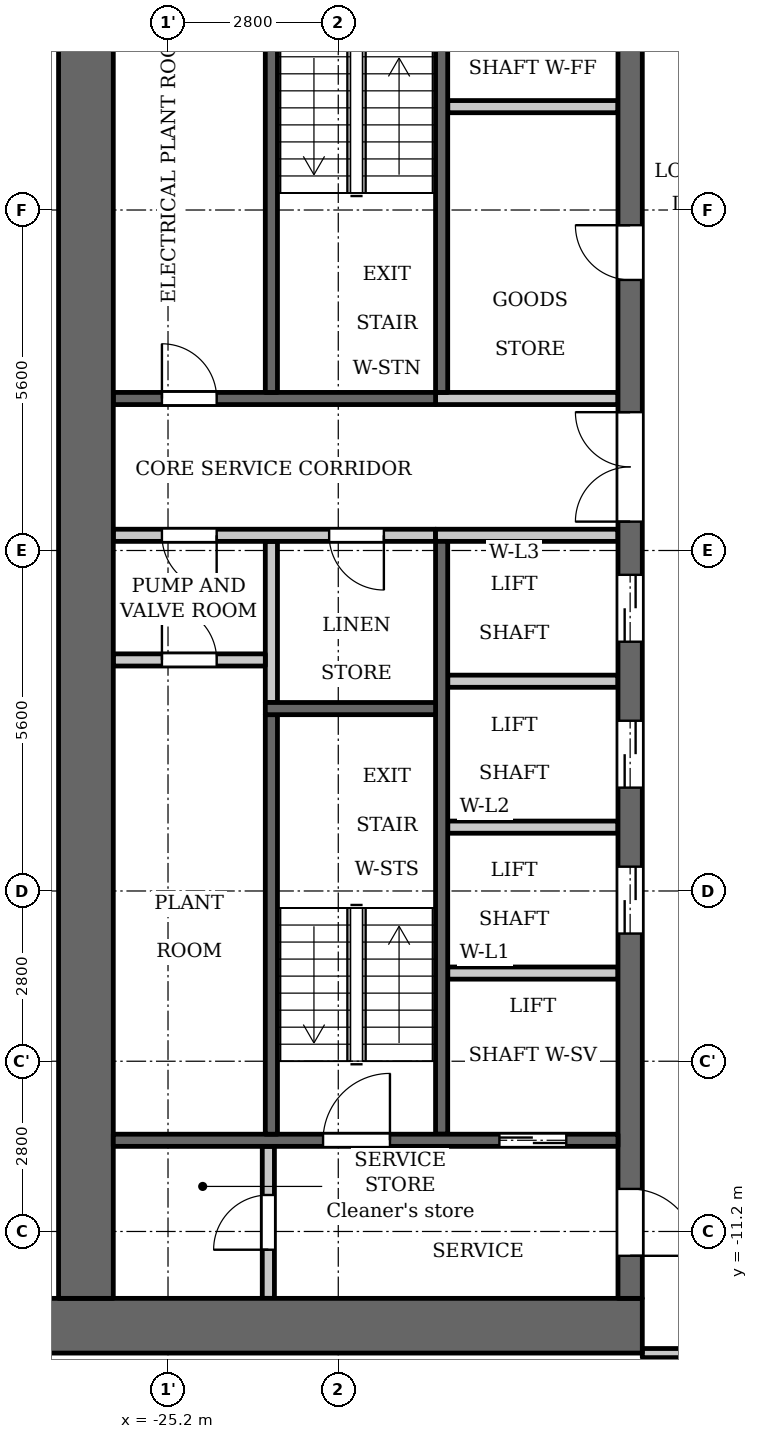
"""IFC4 building model, lengths in metres.
Left out: names, types, materials, properties, quantities, classifications, styles, units other than length and angle.
Written with IfcOpenShell. Run it as: python <this file> out.ifc"""

import sys

from ifc_helpers import new_model, si_unit, direction, frame, frame_2d, origin, place, context, subcontext, project, spatial, rectangle, extrude, element, fill, save


model = new_model("IFC4")
c1 = context("Model", 3, precision=1e-05, world=origin(), true_north=direction((0.0, 1.0)))
c2 = subcontext(c1, "Body", "Model", "MODEL_VIEW")
j1 = project(units=[si_unit("LENGTHUNIT", "METRE"), si_unit("PLANEANGLEUNIT", "RADIAN")], contexts=[c1])
p1 = place(None, origin())
s1 = spatial("IfcSite", under=j1, at=p1, CompositionType="ELEMENT")
p2 = place(p1, origin())
s2 = spatial("IfcBuilding", under=s1, at=p2, CompositionType="ELEMENT")
p3 = place(p2, frame((0.0, 0.0, 30.5)))
s3 = spatial("IfcBuildingStorey", under=s2, at=p3, CompositionType="ELEMENT", Elevation=30.5)
p4 = place(p3, frame((-23.5, -2.5, 0.0), z_axis=(0.0, 0.0, 1.0), x_axis=(0.0, 1.0, 0.0)))
e1 = element("IfcWall", 1, at=p4, inside=s3, PredefinedType="PARTITIONING", context=c2, shape_type="SweptSolid", body=[
    extrude(rectangle(XDim=2.65, YDim=0.2, at=frame_2d((1.325, 0.0))), origin(), (0.0, 0.0, 1.0), 3.2),
])
p5 = place(p3, frame((-20.7, 2.6, 0.0), z_axis=(0.0, 0.0, 1.0), x_axis=(0.0, 1.0, 0.0)))
e2 = element("IfcWall", 2, at=p5, inside=s3, PredefinedType="SHEAR", context=c2, shape_type="SweptSolid", body=[
    extrude(rectangle(XDim=7.0, YDim=0.2, at=frame_2d((3.5, 0.0))), origin(), (0.0, 0.0, 1.0), 3.2),
])
p6 = place(p3, frame((-20.7, -9.6, 0.0), z_axis=(0.0, 0.0, 1.0), x_axis=(0.0, 1.0, 0.0)))
e3 = element("IfcWall", 3, at=p6, inside=s3, PredefinedType="SHEAR", context=c2, shape_type="SweptSolid", body=[
    extrude(rectangle(XDim=9.75, YDim=0.2, at=frame_2d((4.875, 0.0))), origin(), (0.0, 0.0, 1.0), 3.2),
])
p7 = place(p3, frame((-20.8, 2.5, 0.0), z_axis=(0.0, 0.0, 1.0), x_axis=(-1.0, 0.0, 0.0)))
e4 = element("IfcWall", 4, at=p7, inside=s3, PredefinedType="SHEAR", context=c2, shape_type="SweptSolid", body=[
    extrude(rectangle(XDim=5.3, YDim=0.2, at=frame_2d((2.65, 0.0))), origin(), (0.0, 0.0, 1.0), 3.2),
])
p8 = place(p7, frame((3.6, 0.0, 0.0)))
e5 = element("IfcOpeningElement", 5, at=p8, cuts=e4, PredefinedType="OPENING", context=c2, shape_type="SweptSolid", body=[
    extrude(rectangle(XDim=0.9, YDim=2.1, at=frame_2d((0.45, 1.05))), frame((0.0, 0.11, 0.0), z_axis=(0.0, -1.0, 0.0), x_axis=(1.0, 0.0, 0.0)), (0.0, 0.0, 1.0), 0.22),
])
p9 = place(p3, frame((-20.8, 0.25, 0.0), z_axis=(0.0, 0.0, 1.0), x_axis=(-1.0, 0.0, 0.0)))
e6 = element("IfcWall", 6, at=p9, inside=s3, PredefinedType="PARTITIONING", context=c2, shape_type="SweptSolid", body=[
    extrude(rectangle(XDim=5.3, YDim=0.2, at=frame_2d((2.65, 0.0))), origin(), (0.0, 0.0, 1.0), 3.2),
])
p10 = place(p9, frame((0.85, 0.0, 0.0)))
e7 = element("IfcOpeningElement", 7, at=p10, cuts=e6, PredefinedType="OPENING", context=c2, shape_type="SweptSolid", body=[
    extrude(rectangle(XDim=0.9, YDim=2.1, at=frame_2d((0.45, 1.05))), frame((0.0, 0.11, 0.0), z_axis=(0.0, -1.0, 0.0), x_axis=(1.0, 0.0, 0.0)), (0.0, 0.0, 1.0), 0.22),
])
p11 = place(p9, frame((3.6, 0.0, 0.0)))
e8 = element("IfcOpeningElement", 8, at=p11, cuts=e6, PredefinedType="OPENING", context=c2, shape_type="SweptSolid", body=[
    extrude(rectangle(XDim=0.9, YDim=2.1, at=frame_2d((0.45, 1.05))), frame((0.0, 0.11, 0.0), z_axis=(0.0, -1.0, 0.0), x_axis=(1.0, 0.0, 0.0)), (0.0, 0.0, 1.0), 0.22),
])
p12 = place(p3, frame((-17.4, -12.75, 0.0), z_axis=(0.0, 0.0, 1.0), x_axis=(-1.0, 0.0, 0.0)))
e9 = element("IfcWall", 9, at=p12, inside=s3, PredefinedType="SHEAR", context=c2, shape_type="SweptSolid", body=[
    extrude(rectangle(XDim=10.4, YDim=0.9, at=frame_2d((5.2, 0.0))), origin(), (0.0, 0.0, 1.0), 3.2),
])
p13 = place(p3, frame((-17.6, -12.3, 0.0), z_axis=(0.0, 0.0, 1.0), x_axis=(0.0, 1.0, 0.0)))
e10 = element("IfcWall", 10, at=p13, inside=s3, PredefinedType="SHEAR", context=c2, shape_type="SweptSolid", body=[
    extrude(rectangle(XDim=24.6, YDim=0.4, at=frame_2d((12.3, 0.0))), origin(), (0.0, 0.0, 1.0), 3.2),
])
p14 = place(p13, frame((6.0, 0.0, 0.0)))
e11 = element("IfcOpeningElement", 11, at=p14, cuts=e10, PredefinedType="OPENING", context=c2, shape_type="SweptSolid", body=[
    extrude(rectangle(XDim=1.1, YDim=2.1, at=frame_2d((0.55, 1.05))), frame((0.0, 0.21, 0.0), z_axis=(0.0, -1.0, 0.0), x_axis=(1.0, 0.0, 0.0)), (0.0, 0.0, 1.0), 0.42),
])
p15 = place(p13, frame((8.4, 0.0, 0.0)))
e12 = element("IfcOpeningElement", 12, at=p15, cuts=e10, PredefinedType="OPENING", context=c2, shape_type="SweptSolid", body=[
    extrude(rectangle(XDim=1.1, YDim=2.1, at=frame_2d((0.55, 1.05))), frame((0.0, 0.21, 0.0), z_axis=(0.0, -1.0, 0.0), x_axis=(1.0, 0.0, 0.0)), (0.0, 0.0, 1.0), 0.42),
])
p16 = place(p13, frame((10.8, 0.0, 0.0)))
e13 = element("IfcOpeningElement", 13, at=p16, cuts=e10, PredefinedType="OPENING", context=c2, shape_type="SweptSolid", body=[
    extrude(rectangle(XDim=1.1, YDim=2.1, at=frame_2d((0.55, 1.05))), frame((0.0, 0.21, 0.0), z_axis=(0.0, -1.0, 0.0), x_axis=(1.0, 0.0, 0.0)), (0.0, 0.0, 1.0), 0.42),
])
p17 = place(p13, frame((16.75, 0.0, 0.0)))
e14 = element("IfcOpeningElement", 14, at=p17, cuts=e10, PredefinedType="OPENING", context=c2, shape_type="SweptSolid", body=[
    extrude(rectangle(XDim=0.9, YDim=2.1, at=frame_2d((0.45, 1.05))), frame((0.0, 0.21, 0.0), z_axis=(0.0, -1.0, 0.0), x_axis=(1.0, 0.0, 0.0)), (0.0, 0.0, 1.0), 0.42),
])
p18 = place(p13, frame((22.8, 0.0, 0.0)))
e15 = element("IfcOpeningElement", 15, at=p18, cuts=e10, PredefinedType="OPENING", context=c2, shape_type="SweptSolid", body=[
    extrude(rectangle(XDim=1.1, YDim=2.1, at=frame_2d((0.55, 1.05))), frame((0.0, 0.21, 0.0), z_axis=(0.0, -1.0, 0.0), x_axis=(1.0, 0.0, 0.0)), (0.0, 0.0, 1.0), 0.42),
])
p19 = place(p13, frame((0.7, 0.0, 0.0)))
e16 = element("IfcOpeningElement", 16, at=p19, cuts=e10, PredefinedType="OPENING", context=c2, shape_type="SweptSolid", body=[
    extrude(rectangle(XDim=1.1, YDim=2.1, at=frame_2d((0.55, 1.05))), frame((0.0, 0.21, 0.0), z_axis=(0.0, -1.0, 0.0), x_axis=(1.0, 0.0, 0.0)), (0.0, 0.0, 1.0), 0.42),
])
p20 = place(p13, frame((12.775, 0.0, 0.0)))
e17 = element("IfcOpeningElement", 17, at=p20, cuts=e10, PredefinedType="OPENING", context=c2, shape_type="SweptSolid", body=[
    extrude(rectangle(XDim=1.8, YDim=2.1, at=frame_2d((0.9, 1.05))), frame((0.0, 0.21, 0.0), z_axis=(0.0, -1.0, 0.0), x_axis=(1.0, 0.0, 0.0)), (0.0, 0.0, 1.0), 0.42),
])
p21 = place(p3, frame((-26.55, -12.3, 0.0), z_axis=(0.0, 0.0, 1.0), x_axis=(0.0, 1.0, 0.0)))
e18 = element("IfcWall", 18, at=p21, inside=s3, PredefinedType="SHEAR", context=c2, shape_type="SweptSolid", body=[
    extrude(rectangle(XDim=24.6, YDim=0.9, at=frame_2d((12.3, 0.0))), origin(), (0.0, 0.0, 1.0), 3.2),
])
p22 = place(p3, frame((-23.55, -12.3, 0.0), z_axis=(0.0, 0.0, 1.0), x_axis=(0.0, 1.0, 0.0)))
e19 = element("IfcWall", 19, at=p22, inside=s3, PredefinedType="PARTITIONING", context=c2, shape_type="SweptSolid", body=[
    extrude(rectangle(XDim=2.5, YDim=0.2, at=frame_2d((1.25, 0.0))), origin(), (0.0, 0.0, 1.0), 3.2),
])
p23 = place(p22, frame((0.8, 0.0, 0.0)))
e20 = element("IfcOpeningElement", 20, at=p23, cuts=e19, PredefinedType="OPENING", context=c2, shape_type="SweptSolid", body=[
    extrude(rectangle(XDim=0.9, YDim=2.1, at=frame_2d((0.45, 1.05))), frame((0.0, 0.11, 0.0), z_axis=(0.0, -1.0, 0.0), x_axis=(1.0, 0.0, 0.0)), (0.0, 0.0, 1.0), 0.22),
])
p24 = place(p3, frame((-23.6, -1.8, 0.0), z_axis=(0.0, 0.0, 1.0), x_axis=(-1.0, 0.0, 0.0)))
e21 = element("IfcWall", 21, at=p24, inside=s3, PredefinedType="PARTITIONING", context=c2, shape_type="SweptSolid", body=[
    extrude(rectangle(XDim=2.5, YDim=0.2, at=frame_2d((1.25, 0.0))), origin(), (0.0, 0.0, 1.0), 3.2),
])
p25 = place(p24, frame((0.8, 0.0, 0.0)))
e22 = element("IfcOpeningElement", 22, at=p25, cuts=e21, PredefinedType="OPENING", context=c2, shape_type="SweptSolid", body=[
    extrude(rectangle(XDim=0.9, YDim=2.1, at=frame_2d((0.45, 1.05))), frame((0.0, 0.11, 0.0), z_axis=(0.0, -1.0, 0.0), x_axis=(1.0, 0.0, 0.0)), (0.0, 0.0, 1.0), 0.22),
])
p26 = place(p3, frame((-17.8, -9.7, 0.0), z_axis=(0.0, 0.0, 1.0), x_axis=(-1.0, 0.0, 0.0)))
e23 = element("IfcWall", 23, at=p26, inside=s3, PredefinedType="SHEAR", context=c2, shape_type="SweptSolid", body=[
    extrude(rectangle(XDim=8.3, YDim=0.2, at=frame_2d((4.15, 0.0))), origin(), (0.0, 0.0, 1.0), 3.2),
])
p27 = place(p26, frame((0.85, 0.0, 0.0)))
e24 = element("IfcOpeningElement", 24, at=p27, cuts=e23, PredefinedType="OPENING", context=c2, shape_type="SweptSolid", body=[
    extrude(rectangle(XDim=1.1, YDim=2.1, at=frame_2d((0.55, 1.05))), frame((0.0, 0.11, 0.0), z_axis=(0.0, -1.0, 0.0), x_axis=(1.0, 0.0, 0.0)), (0.0, 0.0, 1.0), 0.22),
])
p28 = place(p26, frame((3.75, 0.0, 0.0)))
e25 = element("IfcOpeningElement", 25, at=p28, cuts=e23, PredefinedType="OPENING", context=c2, shape_type="SweptSolid", body=[
    extrude(rectangle(XDim=1.1, YDim=2.1, at=frame_2d((0.55, 1.05))), frame((0.0, 0.11, 0.0), z_axis=(0.0, -1.0, 0.0), x_axis=(1.0, 0.0, 0.0)), (0.0, 0.0, 1.0), 0.22),
])
for number, where, z_axis, x_axis in (
    (26, (-17.8, -6.95, 0.0), (0.0, 0.0, 1.0), (-1.0, 0.0, 0.0)),
    (27, (-17.8, -4.55, 0.0), (0.0, 0.0, 1.0), (-1.0, 0.0, 0.0)),
    (28, (-17.8, -2.15, 0.0), (0.0, 0.0, 1.0), (-1.0, 0.0, 0.0)),
):
    element("IfcWall", number, at=place(p3, frame(where, z_axis=z_axis, x_axis=x_axis)), inside=s3, PredefinedType="PARTITIONING", context=c2, shape_type="SweptSolid", body=[
        extrude(rectangle(XDim=2.8, YDim=0.2, at=frame_2d((1.4, 0.0))), origin(), (0.0, 0.0, 1.0), 3.2),
    ])
for number, where, z_axis, x_axis in (
    (29, (-17.8, 0.25, 0.0), (0.0, 0.0, 1.0), (-1.0, 0.0, 0.0)),
    (30, (-17.8, 2.5, 0.0), (0.0, 0.0, 1.0), (-1.0, 0.0, 0.0)),
):
    element("IfcWall", number, at=place(p3, frame(where, z_axis=z_axis, x_axis=x_axis)), inside=s3, PredefinedType="PARTITIONING", context=c2, shape_type="SweptSolid", body=[
        extrude(rectangle(XDim=3.0, YDim=0.2, at=frame_2d((1.5, 0.0))), origin(), (0.0, 0.0, 1.0), 3.2),
    ])
p29 = place(p3, frame((-17.8, 7.3, 0.0), z_axis=(0.0, 0.0, 1.0), x_axis=(-1.0, 0.0, 0.0)))
e31 = element("IfcWall", 31, at=p29, inside=s3, PredefinedType="PARTITIONING", context=c2, shape_type="SweptSolid", body=[
    extrude(rectangle(XDim=2.8, YDim=0.2, at=frame_2d((1.4, 0.0))), origin(), (0.0, 0.0, 1.0), 3.2),
])
p30 = place(p3, frame((-23.5, 2.6, 0.0), z_axis=(0.0, 0.0, 1.0), x_axis=(0.0, 1.0, 0.0)))
e32 = element("IfcWall", 32, at=p30, inside=s3, PredefinedType="SHEAR", context=c2, shape_type="SweptSolid", body=[
    extrude(rectangle(XDim=7.0, YDim=0.2, at=frame_2d((3.5, 0.0))), origin(), (0.0, 0.0, 1.0), 3.2),
])
p31 = place(p3, frame((-23.5, -9.6, 0.0), z_axis=(0.0, 0.0, 1.0), x_axis=(0.0, 1.0, 0.0)))
e33 = element("IfcWall", 33, at=p31, inside=s3, PredefinedType="SHEAR", context=c2, shape_type="SweptSolid", body=[
    extrude(rectangle(XDim=6.9, YDim=0.2, at=frame_2d((3.45, 0.0))), origin(), (0.0, 0.0, 1.0), 3.2),
])
p32 = place(p3, frame((-20.8, -2.6, 0.0), z_axis=(0.0, 0.0, 1.0), x_axis=(-1.0, 0.0, 0.0)))
e34 = element("IfcWall", 34, at=p32, inside=s3, PredefinedType="SHEAR", context=c2, shape_type="SweptSolid", body=[
    extrude(rectangle(XDim=2.8, YDim=0.2, at=frame_2d((1.4, 0.0))), origin(), (0.0, 0.0, 1.0), 3.2),
])
p33 = place(p3, frame((-17.4, -13.2, 0.0), z_axis=(0.0, 0.0, 1.0), x_axis=(1.0, 0.0, 0.0)))
e35 = element("IfcWall", 35, at=p33, inside=s3, PredefinedType="PARTITIONING", context=c2, shape_type="SweptSolid", body=[
    extrude(rectangle(XDim=34.8, YDim=0.15, at=frame_2d((17.4, 0.0))), origin(), (0.0, 0.0, 1.0), 3.2),
])
p34 = place(p33, frame((0.65, 0.0, 0.0)))
e36 = element("IfcOpeningElement", 36, at=p34, cuts=e35, PredefinedType="OPENING", context=c2, shape_type="SweptSolid", body=[
    extrude(rectangle(XDim=1.0, YDim=2.1, at=frame_2d((0.5, 1.05))), frame((0.0, 0.085, 0.0), z_axis=(0.0, -1.0, 0.0), x_axis=(1.0, 0.0, 0.0)), (0.0, 0.0, 1.0), 0.17),
])
p35 = place(p33, frame((33.05, 0.0, 0.0)))
e37 = element("IfcOpeningElement", 37, at=p35, cuts=e35, PredefinedType="OPENING", context=c2, shape_type="SweptSolid", body=[
    extrude(rectangle(XDim=1.0, YDim=2.1, at=frame_2d((0.5, 1.05))), frame((0.0, 0.085, 0.0), z_axis=(0.0, -1.0, 0.0), x_axis=(1.0, 0.0, 0.0)), (0.0, 0.0, 1.0), 0.17),
])
p36 = place(p33, frame((4.55, 0.0, 0.0)))
e38 = element("IfcOpeningElement", 38, at=p36, cuts=e35, PredefinedType="OPENING", context=c2, shape_type="SweptSolid", body=[
    extrude(rectangle(XDim=1.0, YDim=2.1, at=frame_2d((0.5, 1.05))), frame((0.0, 0.085, 0.0), z_axis=(0.0, -1.0, 0.0), x_axis=(1.0, 0.0, 0.0)), (0.0, 0.0, 1.0), 0.17),
])
p37 = place(p33, frame((6.9, 0.0, 0.0)))
e39 = element("IfcOpeningElement", 39, at=p37, cuts=e35, PredefinedType="OPENING", context=c2, shape_type="SweptSolid", body=[
    extrude(rectangle(XDim=1.0, YDim=2.1, at=frame_2d((0.5, 1.05))), frame((0.0, 0.085, 0.0), z_axis=(0.0, -1.0, 0.0), x_axis=(1.0, 0.0, 0.0)), (0.0, 0.0, 1.0), 0.17),
])
p38 = place(p33, frame((15.75, 0.0, 0.0)))
e40 = element("IfcOpeningElement", 40, at=p38, cuts=e35, PredefinedType="OPENING", context=c2, shape_type="SweptSolid", body=[
    extrude(rectangle(XDim=1.0, YDim=2.1, at=frame_2d((0.5, 1.05))), frame((0.0, 0.085, 0.0), z_axis=(0.0, -1.0, 0.0), x_axis=(1.0, 0.0, 0.0)), (0.0, 0.0, 1.0), 0.17),
])
p39 = place(p33, frame((18.1, 0.0, 0.0)))
e41 = element("IfcOpeningElement", 41, at=p39, cuts=e35, PredefinedType="OPENING", context=c2, shape_type="SweptSolid", body=[
    extrude(rectangle(XDim=1.0, YDim=2.1, at=frame_2d((0.5, 1.05))), frame((0.0, 0.085, 0.0), z_axis=(0.0, -1.0, 0.0), x_axis=(1.0, 0.0, 0.0)), (0.0, 0.0, 1.0), 0.17),
])
p40 = place(p33, frame((26.95, 0.0, 0.0)))
e42 = element("IfcOpeningElement", 42, at=p40, cuts=e35, PredefinedType="OPENING", context=c2, shape_type="SweptSolid", body=[
    extrude(rectangle(XDim=1.0, YDim=2.1, at=frame_2d((0.5, 1.05))), frame((0.0, 0.085, 0.0), z_axis=(0.0, -1.0, 0.0), x_axis=(1.0, 0.0, 0.0)), (0.0, 0.0, 1.0), 0.17),
])
p41 = place(p33, frame((29.25, 0.0, 0.0)))
e43 = element("IfcOpeningElement", 43, at=p41, cuts=e35, PredefinedType="OPENING", context=c2, shape_type="SweptSolid", body=[
    extrude(rectangle(XDim=1.0, YDim=2.1, at=frame_2d((0.5, 1.05))), frame((0.0, 0.085, 0.0), z_axis=(0.0, -1.0, 0.0), x_axis=(1.0, 0.0, 0.0)), (0.0, 0.0, 1.0), 0.17),
])
p42 = place(p27, origin())
e44 = element("IfcDoor", 44, at=p42, inside=s3, OperationType="DOUBLE_DOOR_SLIDING", PredefinedType="DOOR", context=c2, shape_type="SweptSolid", body=[
    extrude(rectangle(XDim=1.1, YDim=2.1, at=frame_2d((0.55, 1.05))), frame((0.0, 0.025, 0.0), z_axis=(0.0, -1.0, 0.0), x_axis=(1.0, 0.0, 0.0)), (0.0, 0.0, 1.0), 0.05),
])
fill(e24, e44)
p43 = place(p14, origin())
e45 = element("IfcDoor", 45, at=p43, inside=s3, OperationType="DOUBLE_DOOR_SLIDING", PredefinedType="DOOR", context=c2, shape_type="SweptSolid", body=[
    extrude(rectangle(XDim=1.1, YDim=2.1, at=frame_2d((0.55, 1.05))), frame((0.0, 0.025, 0.0), z_axis=(0.0, -1.0, 0.0), x_axis=(1.0, 0.0, 0.0)), (0.0, 0.0, 1.0), 0.05),
])
fill(e11, e45)
p44 = place(p15, origin())
e46 = element("IfcDoor", 46, at=p44, inside=s3, OperationType="DOUBLE_DOOR_SLIDING", PredefinedType="DOOR", context=c2, shape_type="SweptSolid", body=[
    extrude(rectangle(XDim=1.1, YDim=2.1, at=frame_2d((0.55, 1.05))), frame((0.0, 0.025, 0.0), z_axis=(0.0, -1.0, 0.0), x_axis=(1.0, 0.0, 0.0)), (0.0, 0.0, 1.0), 0.05),
])
fill(e12, e46)
p45 = place(p16, origin())
e47 = element("IfcDoor", 47, at=p45, inside=s3, OperationType="DOUBLE_DOOR_SLIDING", PredefinedType="DOOR", context=c2, shape_type="SweptSolid", body=[
    extrude(rectangle(XDim=1.1, YDim=2.1, at=frame_2d((0.55, 1.05))), frame((0.0, 0.025, 0.0), z_axis=(0.0, -1.0, 0.0), x_axis=(1.0, 0.0, 0.0)), (0.0, 0.0, 1.0), 0.05),
])
fill(e13, e47)
p46 = place(p17, origin())
e48 = element("IfcDoor", 48, at=p46, inside=s3, OperationType="SINGLE_SWING_LEFT", PredefinedType="DOOR", context=c2, shape_type="SweptSolid", body=[
    extrude(rectangle(XDim=0.9, YDim=2.1, at=frame_2d((0.45, 1.05))), frame((0.0, 0.025, 0.0), z_axis=(0.0, -1.0, 0.0), x_axis=(1.0, 0.0, 0.0)), (0.0, 0.0, 1.0), 0.05),
])
fill(e14, e48)
p47 = place(p19, origin())
e49 = element("IfcDoor", 49, at=p47, inside=s3, OperationType="SINGLE_SWING_LEFT", PredefinedType="DOOR", context=c2, shape_type="SweptSolid", body=[
    extrude(rectangle(XDim=1.1, YDim=2.1, at=frame_2d((0.55, 1.05))), frame((0.0, 0.025, 0.0), z_axis=(0.0, -1.0, 0.0), x_axis=(1.0, 0.0, 0.0)), (0.0, 0.0, 1.0), 0.05),
])
fill(e16, e49)
p48 = place(p23, origin())
e50 = element("IfcDoor", 50, at=p48, inside=s3, OperationType="SINGLE_SWING_RIGHT", PredefinedType="DOOR", context=c2, shape_type="SweptSolid", body=[
    extrude(rectangle(XDim=0.9, YDim=2.1, at=frame_2d((0.45, 1.05))), frame((0.0, 0.025, 0.0), z_axis=(0.0, -1.0, 0.0), x_axis=(1.0, 0.0, 0.0)), (0.0, 0.0, 1.0), 0.05),
])
fill(e20, e50)
p49 = place(p28, origin())
e51 = element("IfcDoor", 51, at=p49, inside=s3, OperationType="SINGLE_SWING_LEFT", PredefinedType="DOOR", context=c2, shape_type="SweptSolid", body=[
    extrude(rectangle(XDim=1.1, YDim=2.1, at=frame_2d((0.55, 1.05))), frame((0.0, 0.025, 0.0), z_axis=(0.0, -1.0, 0.0), x_axis=(1.0, 0.0, 0.0)), (0.0, 0.0, 1.0), 0.05),
])
fill(e25, e51)
p50 = place(p20, origin())
e52 = element("IfcDoor", 52, at=p50, inside=s3, OperationType="DOUBLE_DOOR_SINGLE_SWING", PredefinedType="DOOR", context=c2, shape_type="SweptSolid", body=[
    extrude(rectangle(XDim=1.8, YDim=2.1, at=frame_2d((0.9, 1.05))), frame((0.0, 0.025, 0.0), z_axis=(0.0, -1.0, 0.0), x_axis=(1.0, 0.0, 0.0)), (0.0, 0.0, 1.0), 0.05),
])
fill(e17, e52)
p51 = place(p10, origin())
e53 = element("IfcDoor", 53, at=p51, inside=s3, OperationType="SINGLE_SWING_RIGHT", PredefinedType="DOOR", context=c2, shape_type="SweptSolid", body=[
    extrude(rectangle(XDim=0.9, YDim=2.1, at=frame_2d((0.45, 1.05))), frame((0.0, 0.025, 0.0), z_axis=(0.0, -1.0, 0.0), x_axis=(1.0, 0.0, 0.0)), (0.0, 0.0, 1.0), 0.05),
])
fill(e7, e53)
p52 = place(p25, origin())
e54 = element("IfcDoor", 54, at=p52, inside=s3, OperationType="SINGLE_SWING_RIGHT", PredefinedType="DOOR", context=c2, shape_type="SweptSolid", body=[
    extrude(rectangle(XDim=0.9, YDim=2.1, at=frame_2d((0.45, 1.05))), frame((0.0, 0.025, 0.0), z_axis=(0.0, -1.0, 0.0), x_axis=(1.0, 0.0, 0.0)), (0.0, 0.0, 1.0), 0.05),
])
fill(e22, e54)
p53 = place(p11, origin())
e55 = element("IfcDoor", 55, at=p53, inside=s3, OperationType="SINGLE_SWING_RIGHT", PredefinedType="DOOR", context=c2, shape_type="SweptSolid", body=[
    extrude(rectangle(XDim=0.9, YDim=2.1, at=frame_2d((0.45, 1.05))), frame((0.0, 0.025, 0.0), z_axis=(0.0, -1.0, 0.0), x_axis=(1.0, 0.0, 0.0)), (0.0, 0.0, 1.0), 0.05),
])
fill(e8, e55)
p54 = place(p8, origin())
e56 = element("IfcDoor", 56, at=p54, inside=s3, OperationType="SINGLE_SWING_RIGHT", PredefinedType="DOOR", context=c2, shape_type="SweptSolid", body=[
    extrude(rectangle(XDim=0.9, YDim=2.1, at=frame_2d((0.45, 1.05))), frame((0.0, 0.025, 0.0), z_axis=(0.0, -1.0, 0.0), x_axis=(1.0, 0.0, 0.0)), (0.0, 0.0, 1.0), 0.05),
])
fill(e5, e56)
save(model, sys.argv[1])
